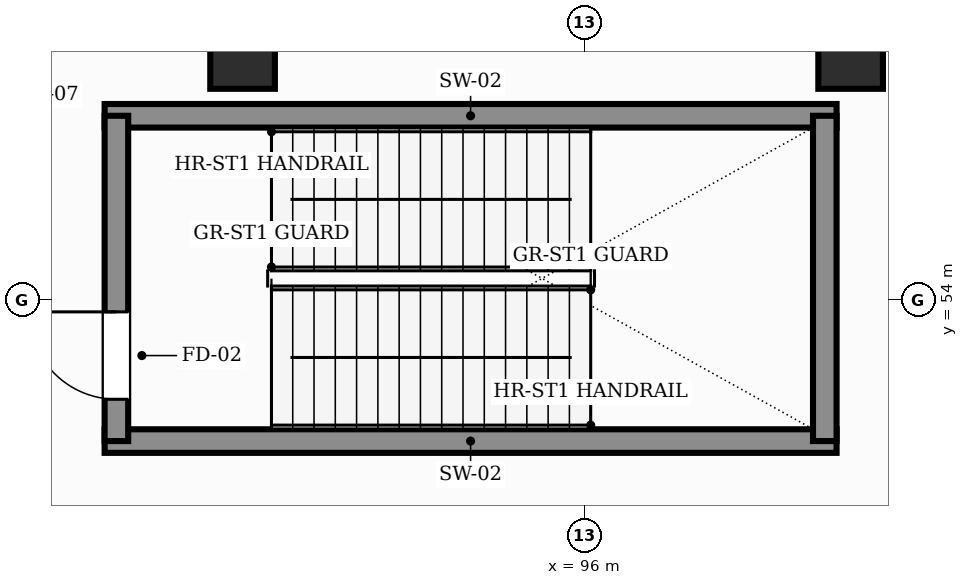
"""IFC4 building model, lengths in metres.
Left out: names, types, materials, properties, quantities, classifications, styles, units other than length and angle.
Written with IfcOpenShell. Run it as: python <this file> out.ifc"""

import sys

from ifc_helpers import new_model, si_unit, direction, frame, frame_2d, origin, origin_2d, place, context, subcontext, project, spatial, rectangle, extrude, element, fill, save


model = new_model("IFC4")
c1 = context("Model", 3, precision=1e-05, world=origin(), true_north=direction((0.0, 1.0)))
c2 = subcontext(c1, "Body", "Model", "MODEL_VIEW")
j1 = project(units=[si_unit("LENGTHUNIT", "METRE"), si_unit("PLANEANGLEUNIT", "RADIAN")], contexts=[c1])
p1 = place(None, origin())
s1 = spatial("IfcSite", under=j1, at=p1, CompositionType="ELEMENT")
p2 = place(p1, origin())
s2 = spatial("IfcBuilding", under=s1, at=p2, CompositionType="ELEMENT")
p3 = place(p2, origin())
s3 = spatial("IfcBuildingStorey", under=s2, at=p3, CompositionType="ELEMENT", Elevation=0.0)
for number, where, z_axis, x_axis in (
    (1, (91.5, 57.2, 0.0), (0.0, 0.0, 1.0), (1.0, 0.0, 0.0)),
    (2, (99.5, 57.2, 0.0), (0.0, 0.0, 1.0), (1.0, 0.0, 0.0)),
):
    element("IfcColumn", number, at=place(p3, frame(where, z_axis=z_axis, x_axis=x_axis)), inside=s3, PredefinedType="COLUMN", context=c2, shape_type="SweptSolid", body=[
        extrude(rectangle(XDim=0.85, YDim=0.85, at=origin_2d()), origin(), (0.0, 0.0, 1.0), 6.0),
    ])
for number, where, z_axis, x_axis in (
    (3, (89.685, 52.14, 0.0), (0.0, 0.0, 1.0), (1.0, 0.0, 0.0)),
    (4, (89.685, 56.42, 0.0), (0.0, 0.0, 1.0), (1.0, 0.0, 0.0)),
):
    element("IfcWall", number, at=place(p3, frame(where, z_axis=z_axis, x_axis=x_axis)), inside=s3, PredefinedType="SHEAR", context=c2, shape_type="SweptSolid", body=[
        extrude(rectangle(XDim=9.63, YDim=0.31, at=frame_2d((4.815, 0.0))), origin(), (0.0, 0.0, 1.0), 6.0),
    ])
p4 = place(p3, frame((89.84, 52.14, 0.0), z_axis=(0.0, 0.0, 1.0), x_axis=(0.0, 1.0, 0.0)))
e5 = element("IfcWall", 5, at=p4, inside=s3, PredefinedType="SHEAR", context=c2, shape_type="SweptSolid", body=[
    extrude(rectangle(XDim=4.28, YDim=0.31, at=frame_2d((2.14, 0.0))), origin(), (0.0, 0.0, 1.0), 6.0),
])
p5 = place(p4, frame((0.55, 0.0, 0.0)))
e6 = element("IfcOpeningElement", 6, at=p5, cuts=e5, PredefinedType="OPENING", context=c2, shape_type="SweptSolid", body=[
    extrude(rectangle(XDim=1.15, YDim=2.2, at=frame_2d((0.575, 1.1))), frame((0.0, 0.165, 0.0), z_axis=(0.0, -1.0, 0.0), x_axis=(1.0, 0.0, 0.0)), (0.0, 0.0, 1.0), 0.33),
])
p6 = place(p3, frame((99.16, 52.14, 0.0), z_axis=(0.0, 0.0, 1.0), x_axis=(0.0, 1.0, 0.0)))
e7 = element("IfcWall", 7, at=p6, inside=s3, PredefinedType="SHEAR", context=c2, shape_type="SweptSolid", body=[
    extrude(rectangle(XDim=4.28, YDim=0.31, at=frame_2d((2.14, 0.0))), origin(), (0.0, 0.0, 1.0), 6.0),
])
p7 = place(p5, origin())
e8 = element("IfcDoor", 8, at=p7, inside=s3, OperationType="SINGLE_SWING_RIGHT", PredefinedType="DOOR", context=c2, shape_type="SweptSolid", body=[
    extrude(rectangle(XDim=1.15, YDim=2.2, at=frame_2d((0.575, 1.1))), frame((0.0, 0.025, 0.0), z_axis=(0.0, -1.0, 0.0), x_axis=(1.0, 0.0, 0.0)), (0.0, 0.0, 1.0), 0.05),
])
fill(e6, e8)
save(model, sys.argv[1])
